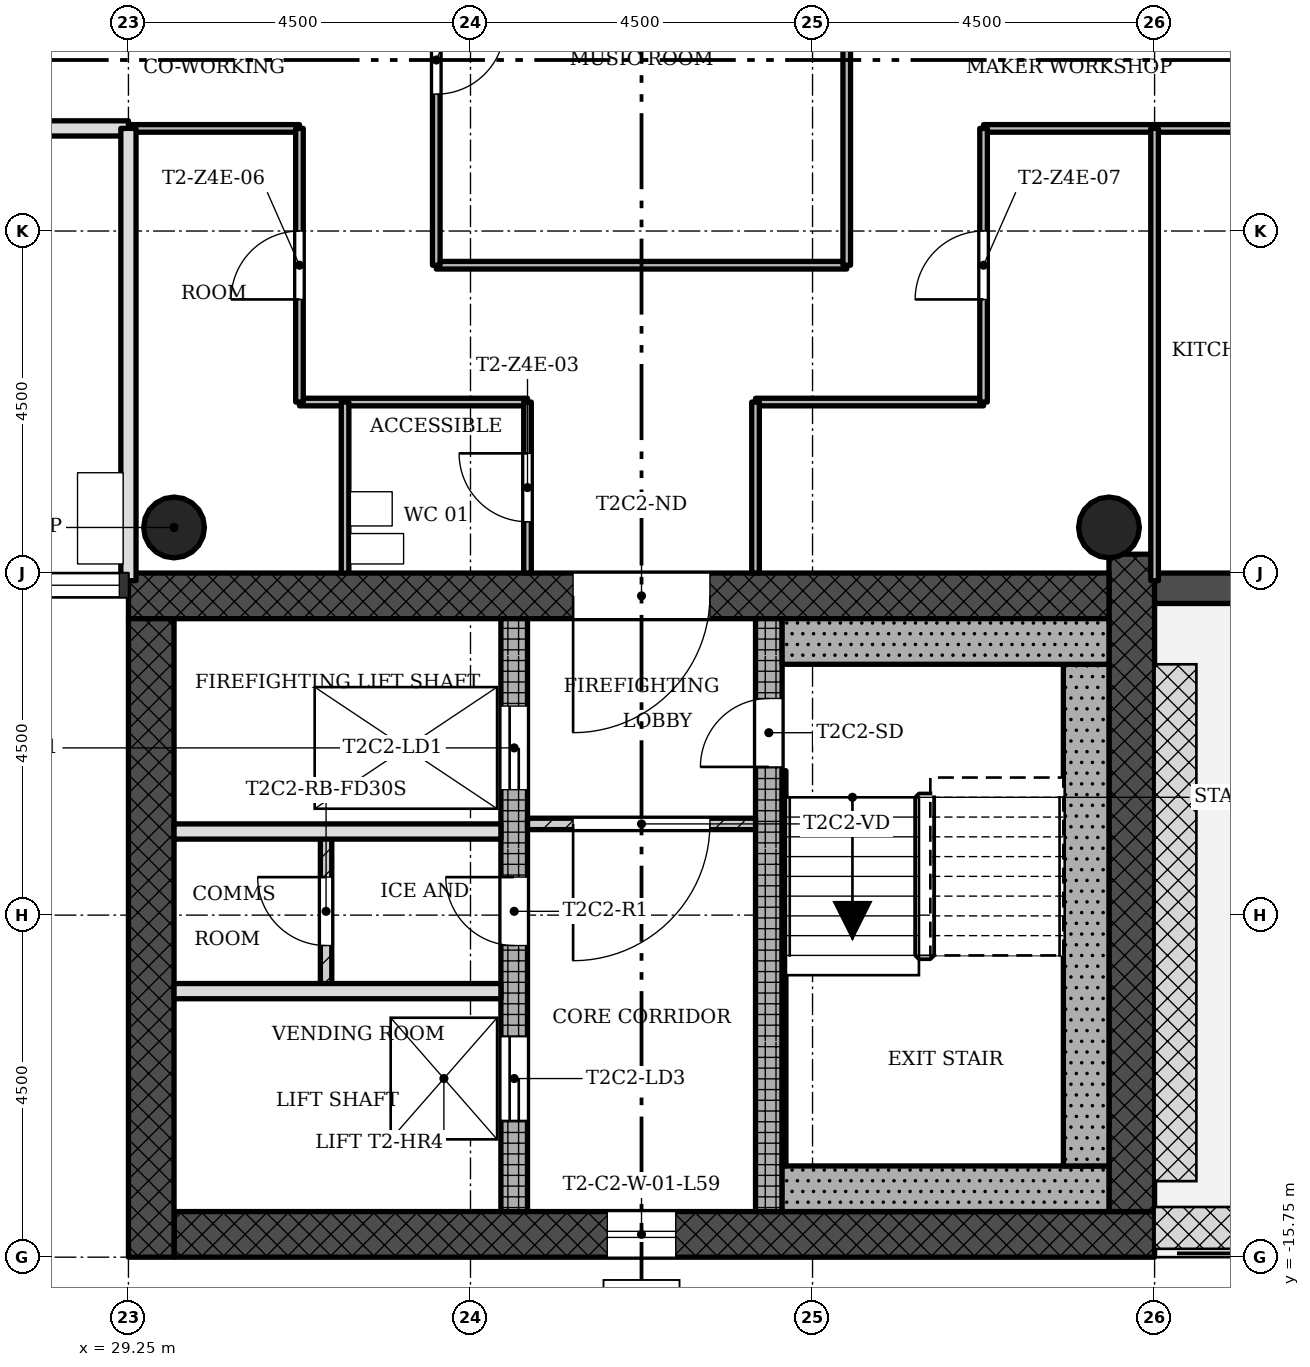
"""IFC4 building model, lengths in metres.
Left out: names, types, materials, properties, quantities, classifications, styles, units other than length and angle.
Written with IfcOpenShell. Run it as: python <this file> out.ifc"""

import sys

from ifc_helpers import new_model, si_unit, direction, frame, frame_2d, origin, origin_2d, place, context, subcontext, project, spatial, rectangle, hollow_circle, extrude, element, fill, save


model = new_model("IFC4")
c1 = context("Model", 3, precision=1e-05, world=origin(), true_north=direction((0.0, 1.0)))
c2 = subcontext(c1, "Body", "Model", "MODEL_VIEW")
j1 = project(units=[si_unit("LENGTHUNIT", "METRE"), si_unit("PLANEANGLEUNIT", "RADIAN")], contexts=[c1])
p1 = place(None, origin())
s1 = spatial("IfcSite", under=j1, at=p1, CompositionType="ELEMENT")
p2 = place(p1, origin())
s2 = spatial("IfcBuilding", under=s1, at=p2, CompositionType="ELEMENT")
p3 = place(p2, frame((0.0, 0.0, 213.0)))
s3 = spatial("IfcBuildingStorey", under=s2, at=p3, CompositionType="ELEMENT", Elevation=213.0)
p4 = place(p3, frame((29.85, -15.45, 0.0), z_axis=(0.0, 0.0, 1.0), x_axis=(1.0, 0.0, 0.0)))
e1 = element("IfcWall", 1, at=p4, inside=s3, PredefinedType="SHEAR", context=c2, shape_type="SweptSolid", body=[
    extrude(rectangle(XDim=12.9, YDim=0.6, at=frame_2d((6.45, 0.0))), origin(), (0.0, 0.0, 1.0), 3.4),
])
p5 = place(p4, frame((5.7, 0.0, 0.45)))
e2 = element("IfcOpeningElement", 2, at=p5, cuts=e1, PredefinedType="OPENING", context=c2, shape_type="SweptSolid", body=[
    extrude(rectangle(XDim=0.9, YDim=2.4, at=frame_2d((0.45, 1.2))), frame((0.0, 0.31, 0.0), z_axis=(0.0, -1.0, 0.0), x_axis=(1.0, 0.0, 0.0)), (0.0, 0.0, 1.0), 0.62),
])
p6 = place(p3, frame((42.45, -15.15, 0.0), z_axis=(0.0, 0.0, 1.0), x_axis=(0.0, 1.0, 0.0)))
e3 = element("IfcWall", 3, at=p6, inside=s3, PredefinedType="SHEAR", context=c2, shape_type="SweptSolid", body=[
    extrude(rectangle(XDim=8.648, YDim=0.6, at=frame_2d((4.324, 0.0))), origin(), (0.0, 0.0, 1.0), 3.4),
])
p7 = place(p3, frame((42.15, -7.05, 0.0), z_axis=(0.0, 0.0, 1.0), x_axis=(-1.0, 0.0, 0.0)))
e4 = element("IfcWall", 4, at=p7, inside=s3, PredefinedType="SHEAR", context=c2, shape_type="SweptSolid", body=[
    extrude(rectangle(XDim=12.9, YDim=0.6, at=frame_2d((6.45, 0.0))), origin(), (0.0, 0.0, 1.0), 3.4),
])
p8 = place(p7, frame((5.25, 0.0, 0.0)))
e5 = element("IfcOpeningElement", 5, at=p8, cuts=e4, PredefinedType="OPENING", context=c2, shape_type="SweptSolid", body=[
    extrude(rectangle(XDim=1.8, YDim=2.1, at=frame_2d((0.9, 1.05))), frame((0.0, 0.31, 0.0), z_axis=(0.0, -1.0, 0.0), x_axis=(1.0, 0.0, 0.0)), (0.0, 0.0, 1.0), 0.62),
])
p9 = place(p3, frame((29.55, -7.35, 0.0), z_axis=(0.0, 0.0, 1.0), x_axis=(0.0, -1.0, 0.0)))
e6 = element("IfcWall", 6, at=p9, inside=s3, PredefinedType="SHEAR", context=c2, shape_type="SweptSolid", body=[
    extrude(rectangle(XDim=8.4, YDim=0.6, at=frame_2d((4.2, 0.0))), origin(), (0.0, 0.0, 1.0), 3.4),
])
p10 = place(p3, frame((34.325, -15.15, 0.0), z_axis=(0.0, 0.0, 1.0), x_axis=(0.0, 1.0, 0.0)))
e7 = element("IfcWall", 7, at=p10, inside=s3, PredefinedType="SHEAR", context=c2, shape_type="SweptSolid", body=[
    extrude(rectangle(XDim=7.8, YDim=0.35, at=frame_2d((3.9, 0.0))), origin(), (0.0, 0.0, 1.0), 3.4),
])
p11 = place(p10, frame((5.55, 0.0, 0.0)))
e8 = element("IfcOpeningElement", 8, at=p11, cuts=e7, PredefinedType="OPENING", context=c2, shape_type="SweptSolid", body=[
    extrude(rectangle(XDim=1.1, YDim=2.1, at=frame_2d((0.55, 1.05))), frame((0.0, 0.185, 0.0), z_axis=(0.0, -1.0, 0.0), x_axis=(1.0, 0.0, 0.0)), (0.0, 0.0, 1.0), 0.37),
])
p12 = place(p10, frame((1.2, 0.0, 0.0)))
e9 = element("IfcOpeningElement", 9, at=p12, cuts=e7, PredefinedType="OPENING", context=c2, shape_type="SweptSolid", body=[
    extrude(rectangle(XDim=1.1, YDim=2.1, at=frame_2d((0.55, 1.05))), frame((0.0, 0.185, 0.0), z_axis=(0.0, -1.0, 0.0), x_axis=(1.0, 0.0, 0.0)), (0.0, 0.0, 1.0), 0.37),
])
p13 = place(p10, frame((3.5, 0.0, 0.0)))
e10 = element("IfcOpeningElement", 10, at=p13, cuts=e7, PredefinedType="OPENING", context=c2, shape_type="SweptSolid", body=[
    extrude(rectangle(XDim=0.9, YDim=2.1, at=frame_2d((0.45, 1.05))), frame((0.0, 0.185, 0.0), z_axis=(0.0, -1.0, 0.0), x_axis=(1.0, 0.0, 0.0)), (0.0, 0.0, 1.0), 0.37),
])
p14 = place(p3, frame((37.675, -15.15, 0.0), z_axis=(0.0, 0.0, 1.0), x_axis=(0.0, 1.0, 0.0)))
e11 = element("IfcWall", 11, at=p14, inside=s3, PredefinedType="SHEAR", context=c2, shape_type="SweptSolid", body=[
    extrude(rectangle(XDim=7.8, YDim=0.35, at=frame_2d((3.9, 0.0))), origin(), (0.0, 0.0, 1.0), 3.4),
])
p15 = place(p14, frame((5.85, 0.0, 0.0)))
e12 = element("IfcOpeningElement", 12, at=p15, cuts=e11, PredefinedType="OPENING", context=c2, shape_type="SweptSolid", body=[
    extrude(rectangle(XDim=0.9, YDim=2.1, at=frame_2d((0.45, 1.05))), frame((0.0, 0.185, 0.0), z_axis=(0.0, -1.0, 0.0), x_axis=(1.0, 0.0, 0.0)), (0.0, 0.0, 1.0), 0.37),
])
for number, where, z_axis, x_axis in (
    (13, (42.15, -6.15, 0.0), (0.0, 0.0, 1.0), (1.0, 0.0, 0.0)),
    (14, (29.85, -6.15, 0.0), (0.0, 0.0, 1.0), (1.0, 0.0, 0.0)),
):
    element("IfcColumn", number, at=place(p3, frame(where, z_axis=z_axis, x_axis=x_axis)), inside=s3, PredefinedType="COLUMN", context=c2, shape_type="SweptSolid", body=[
        extrude(hollow_circle(Radius=0.4, WallThickness=0.028, at=origin_2d()), origin(), (0.0, 0.0, 1.0), 3.4),
    ])
p16 = place(p3, frame((42.75, -6.95, -0.02), z_axis=(0.0, 0.0, 1.0), x_axis=(1.0, 0.0, 0.0)))
e15 = element("IfcWall", 15, at=p16, inside=s3, PredefinedType="STANDARD", context=c2, shape_type="SweptSolid", body=[
    extrude(rectangle(XDim=4.5, YDim=0.4, at=frame_2d((2.25, 0.0))), origin(), (0.0, 0.0, 1.0), 3.12),
])
p17 = place(p16, frame((1.35, 0.0, 0.02)))
e16 = element("IfcOpeningElement", 16, at=p17, cuts=e15, PredefinedType="OPENING", context=c2, shape_type="SweptSolid", body=[
    extrude(rectangle(XDim=1.8, YDim=2.1, at=frame_2d((0.9, 1.05))), frame((0.0, 0.21, 0.0), z_axis=(0.0, -1.0, 0.0), x_axis=(1.0, 0.0, 0.0)), (0.0, 0.0, 1.0), 0.42),
])
p18 = place(p3, frame((34.5, -10.05, 0.0), z_axis=(0.0, 0.0, 1.0), x_axis=(1.0, 0.0, 0.0)))
e17 = element("IfcWall", 17, at=p18, inside=s3, PredefinedType="PARTITIONING", context=c2, shape_type="SweptSolid", body=[
    extrude(rectangle(XDim=3.0, YDim=0.15, at=frame_2d((1.5, 0.0))), origin(), (0.0, 0.0, 1.0), 3.0),
])
p19 = place(p18, frame((0.6, 0.0, 0.0)))
e18 = element("IfcOpeningElement", 18, at=p19, cuts=e17, PredefinedType="OPENING", context=c2, shape_type="SweptSolid", body=[
    extrude(rectangle(XDim=1.8, YDim=2.1, at=frame_2d((0.9, 1.05))), frame((0.0, 0.085, 0.0), z_axis=(0.0, -1.0, 0.0), x_axis=(1.0, 0.0, 0.0)), (0.0, 0.0, 1.0), 0.17),
])
for number, where, z_axis, x_axis in (
    (19, (29.85, -12.25, 0.0), (0.0, 0.0, 1.0), (1.0, 0.0, 0.0)),
    (20, (29.85, -10.15, 0.0), (0.0, 0.0, 1.0), (1.0, 0.0, 0.0)),
):
    element("IfcWall", number, at=place(p3, frame(where, z_axis=z_axis, x_axis=x_axis)), inside=s3, PredefinedType="SOLIDWALL", context=c2, shape_type="SweptSolid", body=[
        extrude(rectangle(XDim=4.3, YDim=0.2, at=frame_2d((2.15, 0.0))), origin(), (0.0, 0.0, 1.0), 3.0),
    ])
p20 = place(p3, frame((31.85, -10.15, 0.0), z_axis=(0.0, 0.0, 1.0), x_axis=(0.0, -1.0, 0.0)))
e21 = element("IfcWall", 21, at=p20, inside=s3, PredefinedType="PARTITIONING", context=c2, shape_type="SweptSolid", body=[
    extrude(rectangle(XDim=2.1, YDim=0.15, at=frame_2d((1.05, 0.0))), origin(), (0.0, 0.0, 1.0), 3.0),
])
p21 = place(p20, frame((0.6, 0.0, 0.0)))
e22 = element("IfcOpeningElement", 22, at=p21, cuts=e21, PredefinedType="OPENING", context=c2, shape_type="SweptSolid", body=[
    extrude(rectangle(XDim=0.9, YDim=2.1, at=frame_2d((0.45, 1.05))), frame((0.0, 0.085, 0.0), z_axis=(0.0, -1.0, 0.0), x_axis=(1.0, 0.0, 0.0)), (0.0, 0.0, 1.0), 0.17),
])
for number, where, z_axis, x_axis in (
    (23, (40.5, -4.5, 0.0), (0.0, 0.0, 1.0), (-1.0, 0.0, 0.0)),
    (24, (34.5, -4.5, 0.0), (0.0, 0.0, 1.0), (-1.0, 0.0, 0.0)),
):
    element("IfcWall", number, at=place(p3, frame(where, z_axis=z_axis, x_axis=x_axis)), inside=s3, PredefinedType="PARTITIONING", context=c2, shape_type="SweptSolid", body=[
        extrude(rectangle(XDim=3.0, YDim=0.1, at=frame_2d((1.5, 0.0))), origin(), (0.0, 0.0, 1.0), 3.0),
    ])
p22 = place(p3, frame((38.7, -2.7, 0.0), z_axis=(0.0, 0.0, 1.0), x_axis=(-1.0, 0.0, 0.0)))
e25 = element("IfcWall", 25, at=p22, inside=s3, PredefinedType="PARTITIONING", context=c2, shape_type="SweptSolid", body=[
    extrude(rectangle(XDim=5.4, YDim=0.1, at=frame_2d((2.7, 0.0))), origin(), (0.0, 0.0, 1.0), 3.0),
])
p23 = place(p3, frame((44.55, -0.9, 0.0), z_axis=(0.0, 0.0, 1.0), x_axis=(-1.0, 0.0, 0.0)))
e26 = element("IfcWall", 26, at=p23, inside=s3, PredefinedType="PARTITIONING", context=c2, shape_type="SweptSolid", body=[
    extrude(rectangle(XDim=4.05, YDim=0.1, at=frame_2d((2.025, 0.0))), origin(), (0.0, 0.0, 1.0), 3.0),
])
p24 = place(p3, frame((31.5, -0.9, 0.0), z_axis=(0.0, 0.0, 1.0), x_axis=(-1.0, 0.0, 0.0)))
e27 = element("IfcWall", 27, at=p24, inside=s3, PredefinedType="PARTITIONING", context=c2, shape_type="SweptSolid", body=[
    extrude(rectangle(XDim=2.25, YDim=0.1, at=frame_2d((1.125, 0.0))), origin(), (0.0, 0.0, 1.0), 3.0),
])
p25 = place(p3, frame((29.25, -0.9, 0.0), z_axis=(0.0, 0.0, 1.0), x_axis=(-1.0, 0.0, 0.0)))
e28 = element("IfcWall", 28, at=p25, inside=s3, PredefinedType="SOLIDWALL", context=c2, shape_type="SweptSolid", body=[
    extrude(rectangle(XDim=9.0, YDim=0.2, at=frame_2d((4.5, 0.0))), origin(), (0.0, 0.0, 1.0), 3.0),
])
p26 = place(p25, frame((6.15, 0.0, 0.0)))
e29 = element("IfcOpeningElement", 29, at=p26, cuts=e28, PredefinedType="OPENING", context=c2, shape_type="SweptSolid", body=[
    extrude(rectangle(XDim=0.9, YDim=2.1, at=frame_2d((0.45, 1.05))), frame((0.0, 0.11, 0.0), z_axis=(0.0, -1.0, 0.0), x_axis=(1.0, 0.0, 0.0)), (0.0, 0.0, 1.0), 0.22),
])
p27 = place(p3, frame((42.75, -6.85, 0.0), z_axis=(0.0, 0.0, 1.0), x_axis=(0.0, 1.0, 0.0)))
e30 = element("IfcWall", 30, at=p27, inside=s3, PredefinedType="PARTITIONING", context=c2, shape_type="SweptSolid", body=[
    extrude(rectangle(XDim=5.95, YDim=0.1, at=frame_2d((2.975, 0.0))), origin(), (0.0, 0.0, 1.0), 3.0),
])
p28 = place(p3, frame((40.5, -4.5, 0.0), z_axis=(0.0, 0.0, 1.0), x_axis=(0.0, 1.0, 0.0)))
e31 = element("IfcWall", 31, at=p28, inside=s3, PredefinedType="PARTITIONING", context=c2, shape_type="SweptSolid", body=[
    extrude(rectangle(XDim=3.6, YDim=0.1, at=frame_2d((1.8, 0.0))), origin(), (0.0, 0.0, 1.0), 3.0),
])
p29 = place(p28, frame((1.35, 0.0, 0.0)))
e32 = element("IfcOpeningElement", 32, at=p29, cuts=e31, PredefinedType="OPENING", context=c2, shape_type="SweptSolid", body=[
    extrude(rectangle(XDim=0.9, YDim=2.1, at=frame_2d((0.45, 1.05))), frame((0.0, 0.06, 0.0), z_axis=(0.0, -1.0, 0.0), x_axis=(1.0, 0.0, 0.0)), (0.0, 0.0, 1.0), 0.12),
])
p30 = place(p3, frame((38.7, -2.7, 0.0), z_axis=(0.0, 0.0, 1.0), x_axis=(0.0, 1.0, 0.0)))
e33 = element("IfcWall", 33, at=p30, inside=s3, PredefinedType="PARTITIONING", context=c2, shape_type="SweptSolid", body=[
    extrude(rectangle(XDim=5.4, YDim=0.1, at=frame_2d((2.7, 0.0))), origin(), (0.0, 0.0, 1.0), 3.0),
])
p31 = place(p3, frame((37.5, -6.75, 0.0), z_axis=(0.0, 0.0, 1.0), x_axis=(0.0, 1.0, 0.0)))
e34 = element("IfcWall", 34, at=p31, inside=s3, PredefinedType="PARTITIONING", context=c2, shape_type="SweptSolid", body=[
    extrude(rectangle(XDim=2.25, YDim=0.1, at=frame_2d((1.125, 0.0))), origin(), (0.0, 0.0, 1.0), 3.0),
])
p32 = place(p3, frame((34.5, -6.75, 0.0), z_axis=(0.0, 0.0, 1.0), x_axis=(0.0, 1.0, 0.0)))
e35 = element("IfcWall", 35, at=p32, inside=s3, PredefinedType="PARTITIONING", context=c2, shape_type="SweptSolid", body=[
    extrude(rectangle(XDim=2.25, YDim=0.1, at=frame_2d((1.125, 0.0))), origin(), (0.0, 0.0, 1.0), 3.0),
])
p33 = place(p32, frame((0.675, 0.0, 0.0)))
e36 = element("IfcOpeningElement", 36, at=p33, cuts=e35, PredefinedType="OPENING", context=c2, shape_type="SweptSolid", body=[
    extrude(rectangle(XDim=0.9, YDim=2.1, at=frame_2d((0.45, 1.05))), frame((0.0, 0.06, 0.0), z_axis=(0.0, -1.0, 0.0), x_axis=(1.0, 0.0, 0.0)), (0.0, 0.0, 1.0), 0.12),
])
p34 = place(p3, frame((33.3, -2.7, 0.0), z_axis=(0.0, 0.0, 1.0), x_axis=(0.0, 1.0, 0.0)))
e37 = element("IfcWall", 37, at=p34, inside=s3, PredefinedType="PARTITIONING", context=c2, shape_type="SweptSolid", body=[
    extrude(rectangle(XDim=5.4, YDim=0.1, at=frame_2d((2.7, 0.0))), origin(), (0.0, 0.0, 1.0), 3.0),
])
p35 = place(p34, frame((2.25, 0.0, 0.0)))
e38 = element("IfcOpeningElement", 38, at=p35, cuts=e37, PredefinedType="OPENING", context=c2, shape_type="SweptSolid", body=[
    extrude(rectangle(XDim=0.9, YDim=2.1, at=frame_2d((0.45, 1.05))), frame((0.0, 0.06, 0.0), z_axis=(0.0, -1.0, 0.0), x_axis=(1.0, 0.0, 0.0)), (0.0, 0.0, 1.0), 0.12),
])
p36 = place(p3, frame((32.1, -6.75, 0.0), z_axis=(0.0, 0.0, 1.0), x_axis=(0.0, 1.0, 0.0)))
e39 = element("IfcWall", 39, at=p36, inside=s3, PredefinedType="PARTITIONING", context=c2, shape_type="SweptSolid", body=[
    extrude(rectangle(XDim=2.25, YDim=0.1, at=frame_2d((1.125, 0.0))), origin(), (0.0, 0.0, 1.0), 3.0),
])
p37 = place(p3, frame((31.5, -4.5, 0.0), z_axis=(0.0, 0.0, 1.0), x_axis=(0.0, 1.0, 0.0)))
e40 = element("IfcWall", 40, at=p37, inside=s3, PredefinedType="PARTITIONING", context=c2, shape_type="SweptSolid", body=[
    extrude(rectangle(XDim=3.6, YDim=0.1, at=frame_2d((1.8, 0.0))), origin(), (0.0, 0.0, 1.0), 3.0),
])
p38 = place(p37, frame((1.35, 0.0, 0.0)))
e41 = element("IfcOpeningElement", 41, at=p38, cuts=e40, PredefinedType="OPENING", context=c2, shape_type="SweptSolid", body=[
    extrude(rectangle(XDim=0.9, YDim=2.1, at=frame_2d((0.45, 1.05))), frame((0.0, 0.06, 0.0), z_axis=(0.0, -1.0, 0.0), x_axis=(1.0, 0.0, 0.0)), (0.0, 0.0, 1.0), 0.12),
])
p39 = place(p3, frame((29.25, -6.85, 0.0), z_axis=(0.0, 0.0, 1.0), x_axis=(0.0, 1.0, 0.0)))
e42 = element("IfcWall", 42, at=p39, inside=s3, PredefinedType="SOLIDWALL", context=c2, shape_type="SweptSolid", body=[
    extrude(rectangle(XDim=5.95, YDim=0.2, at=frame_2d((2.975, 0.0))), origin(), (0.0, 0.0, 1.0), 3.0),
])
p40 = place(p3, frame((37.85, -14.85, 0.0), z_axis=(0.0, 0.0, 1.0), x_axis=(1.0, 0.0, 0.0)))
e43 = element("IfcWall", 43, at=p40, inside=s3, PredefinedType="SHEAR", context=c2, shape_type="SweptSolid", body=[
    extrude(rectangle(XDim=4.3, YDim=0.6, at=frame_2d((2.15, 0.0))), origin(), (0.0, 0.0, 1.0), 3.4),
])
p41 = place(p3, frame((41.85, -7.95, 0.0), z_axis=(0.0, 0.0, 1.0), x_axis=(0.0, -1.0, 0.0)))
e44 = element("IfcWall", 44, at=p41, inside=s3, PredefinedType="SHEAR", context=c2, shape_type="SweptSolid", body=[
    extrude(rectangle(XDim=6.6, YDim=0.6, at=frame_2d((3.3, 0.0))), origin(), (0.0, 0.0, 1.0), 3.4),
])
p42 = place(p3, frame((37.85, -7.65, 0.0), z_axis=(0.0, 0.0, 1.0), x_axis=(1.0, 0.0, 0.0)))
e45 = element("IfcWall", 45, at=p42, inside=s3, PredefinedType="SHEAR", context=c2, shape_type="SweptSolid", body=[
    extrude(rectangle(XDim=4.3, YDim=0.6, at=frame_2d((2.15, 0.0))), origin(), (0.0, 0.0, 1.0), 3.4),
])
p43 = place(p3, frame((37.875, -9.35, 0.0), z_axis=(0.0, 0.0, 1.0), x_axis=(0.0, -1.0, 0.0)))
e46 = element("IfcWall", 46, at=p43, inside=s3, PredefinedType="SHEAR", context=c2, shape_type="SweptSolid", body=[
    extrude(rectangle(XDim=5.2, YDim=0.05, at=frame_2d((2.6, 0.0))), origin(), (0.0, 0.0, 1.0), 3.4),
])
p44 = place(p5, origin())
e47 = element("IfcWindow", 47, at=p44, inside=s3, PartitioningType="SINGLE_PANEL", PredefinedType="WINDOW", context=c2, shape_type="SweptSolid", body=[
    extrude(rectangle(XDim=0.9, YDim=2.4, at=frame_2d((0.45, 1.2))), frame((0.0, 0.03, 0.0), z_axis=(0.0, -1.0, 0.0), x_axis=(1.0, 0.0, 0.0)), (0.0, 0.0, 1.0), 0.06),
])
fill(e2, e47)
p45 = place(p19, origin())
e48 = element("IfcDoor", 48, at=p45, inside=s3, OperationType="SINGLE_SWING_LEFT", PredefinedType="DOOR", context=c2, shape_type="SweptSolid", body=[
    extrude(rectangle(XDim=1.8, YDim=2.1, at=frame_2d((0.9, 1.05))), frame((0.0, 0.025, 0.0), z_axis=(0.0, -1.0, 0.0), x_axis=(1.0, 0.0, 0.0)), (0.0, 0.0, 1.0), 0.05),
])
fill(e18, e48)
p46 = place(p21, origin())
e49 = element("IfcDoor", 49, at=p46, inside=s3, OperationType="SINGLE_SWING_LEFT", PredefinedType="DOOR", context=c2, shape_type="SweptSolid", body=[
    extrude(rectangle(XDim=0.9, YDim=2.1, at=frame_2d((0.45, 1.05))), frame((0.0, 0.025, 0.0), z_axis=(0.0, -1.0, 0.0), x_axis=(1.0, 0.0, 0.0)), (0.0, 0.0, 1.0), 0.05),
])
fill(e22, e49)
p47 = place(p35, origin())
e50 = element("IfcDoor", 50, at=p47, inside=s3, OperationType="SINGLE_SWING_RIGHT", PredefinedType="DOOR", context=c2, shape_type="SweptSolid", body=[
    extrude(rectangle(XDim=0.9, YDim=2.1, at=frame_2d((0.45, 1.05))), frame((0.0, 0.025, 0.0), z_axis=(0.0, -1.0, 0.0), x_axis=(1.0, 0.0, 0.0)), (0.0, 0.0, 1.0), 0.05),
])
fill(e38, e50)
p48 = place(p33, origin())
e51 = element("IfcDoor", 51, at=p48, inside=s3, OperationType="SINGLE_SWING_LEFT", PredefinedType="DOOR", context=c2, shape_type="SweptSolid", body=[
    extrude(rectangle(XDim=0.9, YDim=2.1, at=frame_2d((0.45, 1.05))), frame((0.0, 0.025, 0.0), z_axis=(0.0, -1.0, 0.0), x_axis=(1.0, 0.0, 0.0)), (0.0, 0.0, 1.0), 0.05),
])
fill(e36, e51)
p49 = place(p38, origin())
e52 = element("IfcDoor", 52, at=p49, inside=s3, OperationType="SINGLE_SWING_RIGHT", PredefinedType="DOOR", context=c2, shape_type="SweptSolid", body=[
    extrude(rectangle(XDim=0.9, YDim=2.1, at=frame_2d((0.45, 1.05))), frame((0.0, 0.025, 0.0), z_axis=(0.0, -1.0, 0.0), x_axis=(1.0, 0.0, 0.0)), (0.0, 0.0, 1.0), 0.05),
])
fill(e41, e52)
p50 = place(p29, origin())
e53 = element("IfcDoor", 53, at=p50, inside=s3, OperationType="SINGLE_SWING_RIGHT", PredefinedType="DOOR", context=c2, shape_type="SweptSolid", body=[
    extrude(rectangle(XDim=0.9, YDim=2.1, at=frame_2d((0.45, 1.05))), frame((0.0, 0.025, 0.0), z_axis=(0.0, -1.0, 0.0), x_axis=(1.0, 0.0, 0.0)), (0.0, 0.0, 1.0), 0.05),
])
fill(e32, e53)
p51 = place(p15, origin())
e54 = element("IfcDoor", 54, at=p51, inside=s3, OperationType="SINGLE_SWING_RIGHT", PredefinedType="DOOR", context=c2, shape_type="SweptSolid", body=[
    extrude(rectangle(XDim=0.9, YDim=2.1, at=frame_2d((0.45, 1.05))), frame((0.0, 0.025, 0.0), z_axis=(0.0, -1.0, 0.0), x_axis=(1.0, 0.0, 0.0)), (0.0, 0.0, 1.0), 0.05),
])
fill(e12, e54)
p52 = place(p11, origin())
e55 = element("IfcDoor", 55, at=p52, inside=s3, OperationType="SLIDING_TO_LEFT", PredefinedType="DOOR", context=c2, shape_type="SweptSolid", body=[
    extrude(rectangle(XDim=1.1, YDim=2.1, at=frame_2d((0.55, 1.05))), frame((0.0, 0.025, 0.0), z_axis=(0.0, -1.0, 0.0), x_axis=(1.0, 0.0, 0.0)), (0.0, 0.0, 1.0), 0.05),
])
fill(e8, e55)
p53 = place(p12, origin())
e56 = element("IfcDoor", 56, at=p53, inside=s3, OperationType="SLIDING_TO_LEFT", PredefinedType="DOOR", context=c2, shape_type="SweptSolid", body=[
    extrude(rectangle(XDim=1.1, YDim=2.1, at=frame_2d((0.55, 1.05))), frame((0.0, 0.025, 0.0), z_axis=(0.0, -1.0, 0.0), x_axis=(1.0, 0.0, 0.0)), (0.0, 0.0, 1.0), 0.05),
])
fill(e9, e56)
p54 = place(p13, origin())
e57 = element("IfcDoor", 57, at=p54, inside=s3, OperationType="SINGLE_SWING_LEFT", PredefinedType="DOOR", context=c2, shape_type="SweptSolid", body=[
    extrude(rectangle(XDim=0.9, YDim=2.1, at=frame_2d((0.45, 1.05))), frame((0.0, 0.025, 0.0), z_axis=(0.0, -1.0, 0.0), x_axis=(1.0, 0.0, 0.0)), (0.0, 0.0, 1.0), 0.05),
])
fill(e10, e57)
p55 = place(p8, origin())
e58 = element("IfcDoor", 58, at=p55, inside=s3, OperationType="SINGLE_SWING_LEFT", PredefinedType="DOOR", context=c2, shape_type="SweptSolid", body=[
    extrude(rectangle(XDim=1.8, YDim=2.1, at=frame_2d((0.9, 1.05))), frame((0.0, 0.025, 0.0), z_axis=(0.0, -1.0, 0.0), x_axis=(1.0, 0.0, 0.0)), (0.0, 0.0, 1.0), 0.05),
])
fill(e5, e58)
save(model, sys.argv[1])
